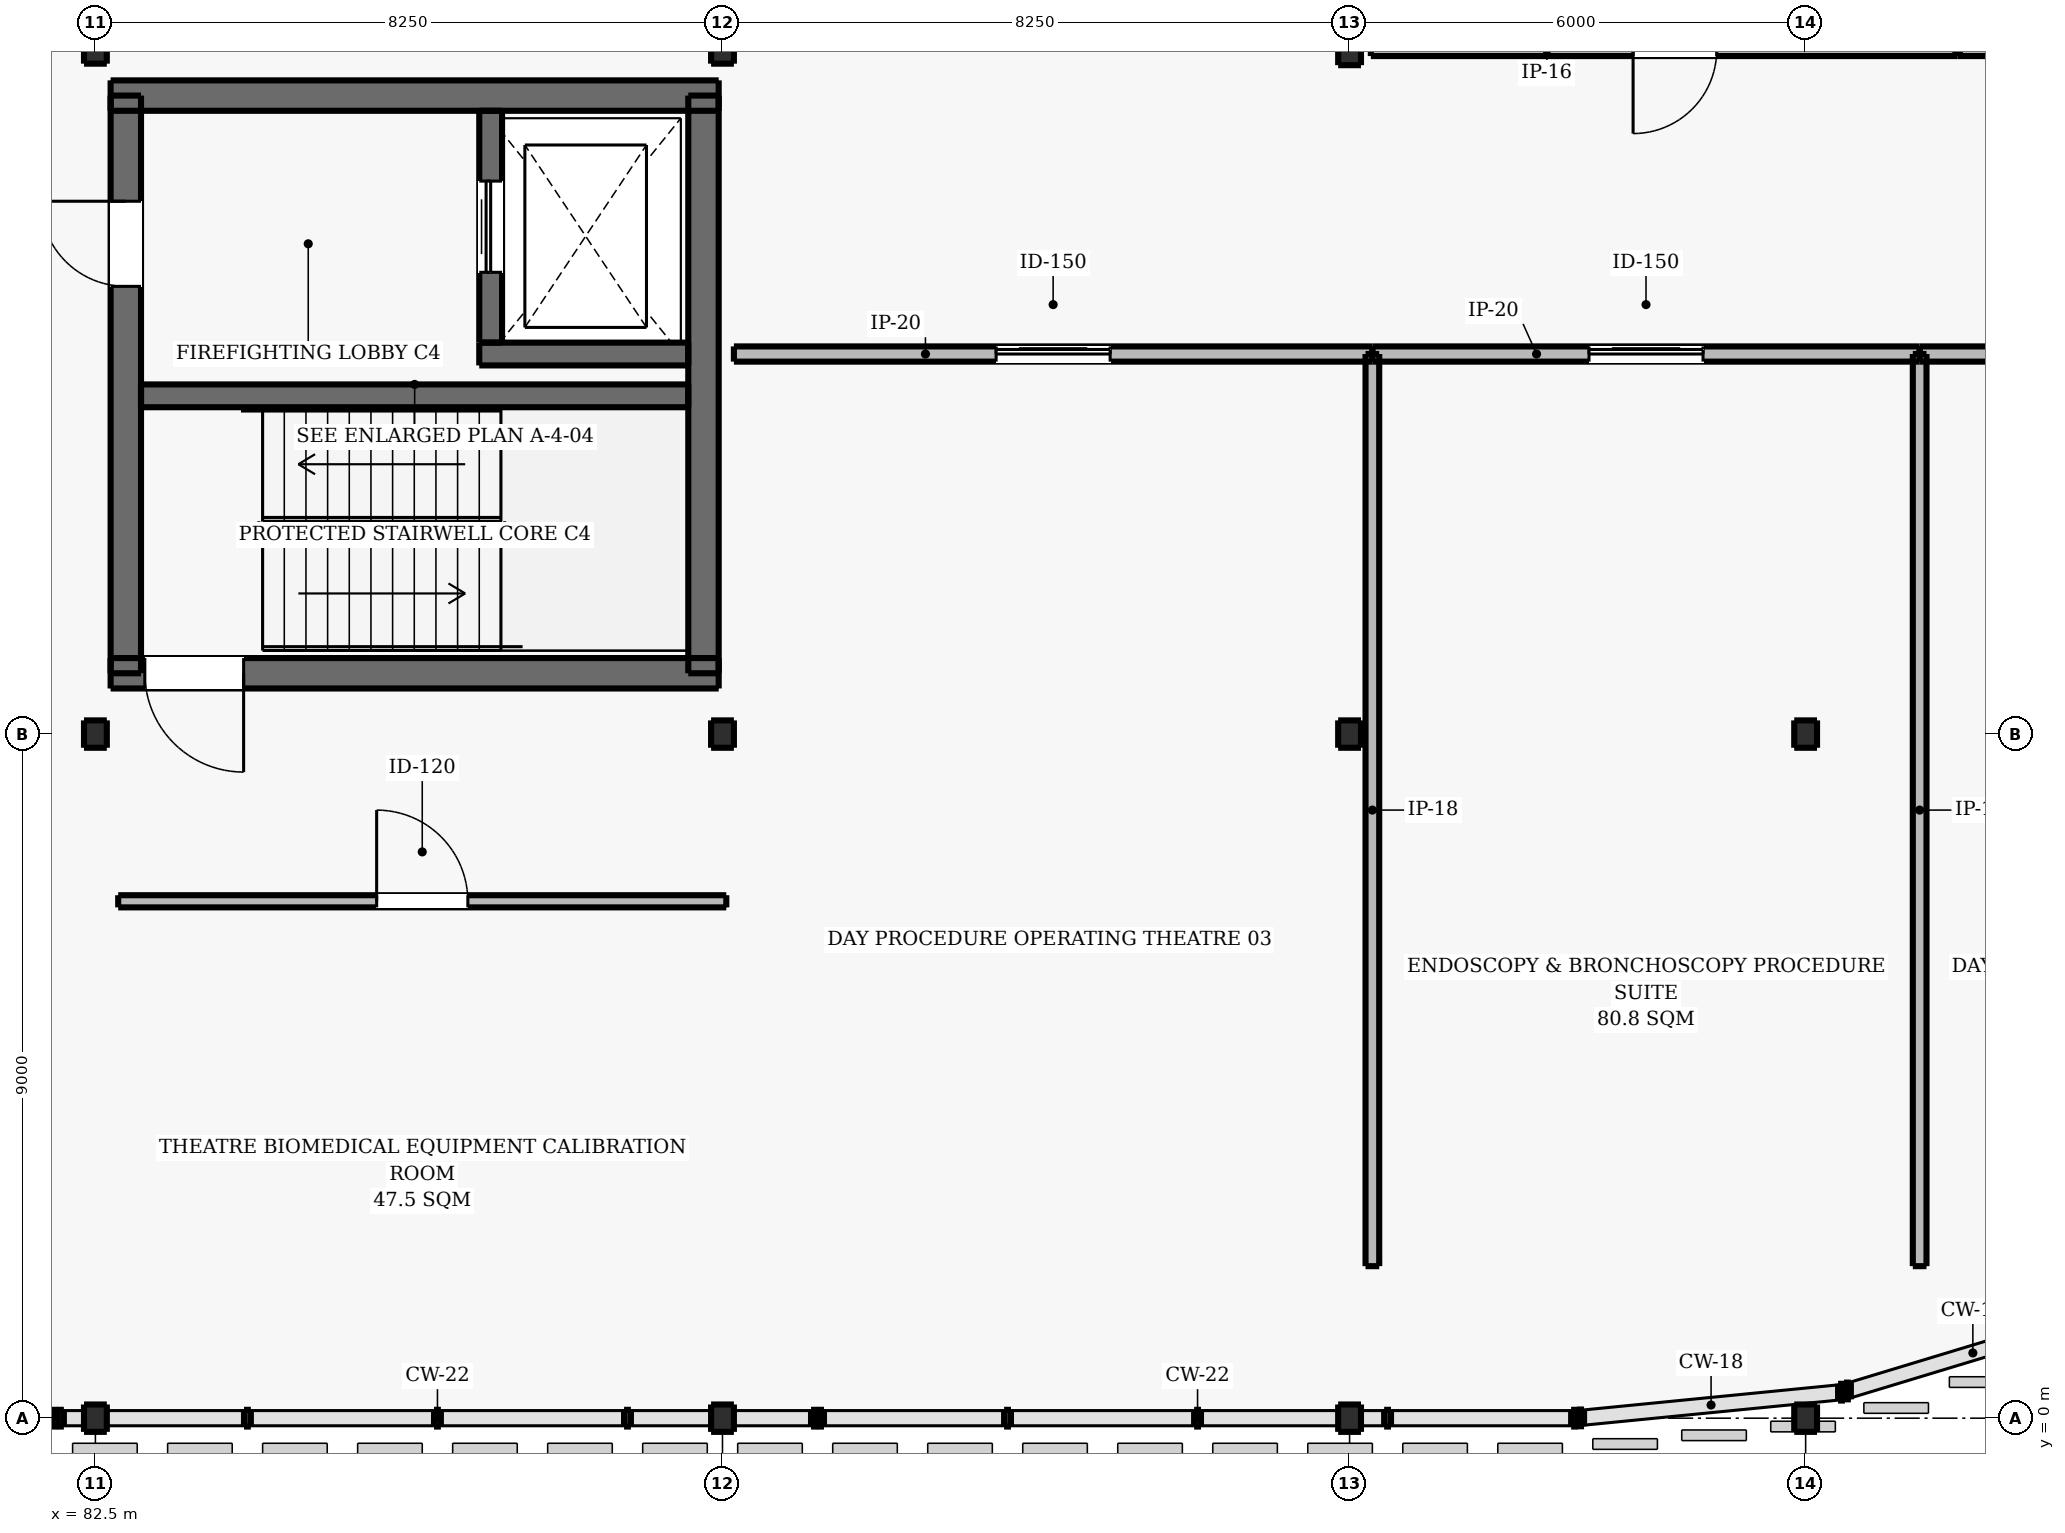
"""IFC4 building model, lengths in metres.
Left out: names, types, materials, properties, quantities, classifications, styles, units other than length and angle.
Written with IfcOpenShell. Run it as: python <this file> out.ifc"""

import sys

from ifc_helpers import new_model, si_unit, direction, frame, frame_2d, origin, origin_2d, place, context, subcontext, project, spatial, rectangle, i_section, extrude, element, fill, save


model = new_model("IFC4")
c1 = context("Model", 3, precision=1e-05, world=origin(), true_north=direction((0.0, 1.0)))
c2 = subcontext(c1, "Body", "Model", "MODEL_VIEW")
j1 = project(units=[si_unit("LENGTHUNIT", "METRE"), si_unit("PLANEANGLEUNIT", "RADIAN")], contexts=[c1])
p1 = place(None, origin())
s1 = spatial("IfcSite", under=j1, at=p1, CompositionType="ELEMENT")
p2 = place(p1, origin())
s2 = spatial("IfcBuilding", under=s1, at=p2, CompositionType="ELEMENT")
p3 = place(p2, frame((0.0, 0.0, 13.8)))
s3 = spatial("IfcBuildingStorey", under=s2, at=p3, CompositionType="ELEMENT", Elevation=13.8)
for number, where, z_axis, x_axis in (
    (1, (82.5, 0.0, 0.0), (0.0, 0.0, 1.0), (1.0, 0.0, 0.0)),
    (2, (82.5, 9.0, 0.0), (0.0, 0.0, 1.0), (1.0, 0.0, 0.0)),
    (3, (82.5, 18.0, 0.0), (0.0, 0.0, 1.0), (1.0, 0.0, 0.0)),
    (4, (90.75, 0.0, 0.0), (0.0, 0.0, 1.0), (1.0, 0.0, 0.0)),
    (5, (90.75, 9.0, 0.0), (0.0, 0.0, 1.0), (1.0, 0.0, 0.0)),
    (6, (90.75, 18.0, 0.0), (0.0, 0.0, 1.0), (1.0, 0.0, 0.0)),
    (7, (99.0, 0.0, 0.0), (0.0, 0.0, 1.0), (1.0, 0.0, 0.0)),
    (8, (99.0, 9.0, 0.0), (0.0, 0.0, 1.0), (1.0, 0.0, 0.0)),
):
    element("IfcColumn", number, at=place(p3, frame(where, z_axis=z_axis, x_axis=x_axis)), inside=s3, PredefinedType="COLUMN", context=c2, shape_type="SweptSolid", body=[
        extrude(i_section(OverallWidth=0.3, OverallDepth=0.36, WebThickness=0.012, FlangeThickness=0.022, FilletRadius=0.027, at=origin_2d()), origin(), (0.0, 0.0, 1.0), 4.2),
    ])
p4 = place(p3, frame((99.0, 18.0, 0.0), z_axis=(0.0, 0.0, 1.0), x_axis=(1.0, 0.0, 0.0)))
e9 = element("IfcColumn", 9, at=p4, inside=s3, PredefinedType="COLUMN", context=c2, shape_type="SweptSolid", body=[
    extrude(i_section(OverallWidth=0.3, OverallDepth=0.4, WebThickness=0.013, FlangeThickness=0.024, FilletRadius=0.027, at=origin_2d()), origin(), (0.0, 0.0, 1.0), 4.2),
])
for number, where, z_axis, x_axis in (
    (10, (105.0, 0.0, 0.0), (0.0, 0.0, 1.0), (1.0, 0.0, 0.0)),
    (11, (105.0, 9.0, 0.0), (0.0, 0.0, 1.0), (1.0, 0.0, 0.0)),
):
    element("IfcColumn", number, at=place(p3, frame(where, z_axis=z_axis, x_axis=x_axis)), inside=s3, PredefinedType="COLUMN", context=c2, shape_type="SweptSolid", body=[
        extrude(i_section(OverallWidth=0.3, OverallDepth=0.36, WebThickness=0.012, FlangeThickness=0.022, FilletRadius=0.027, at=origin_2d()), origin(), (0.0, 0.0, 1.0), 4.2),
    ])
p5 = place(p3, frame((82.7, 9.8, 0.0), z_axis=(0.0, 0.0, 1.0), x_axis=(1.0, 0.0, 0.0)))
e12 = element("IfcWall", 12, at=p5, inside=s3, PredefinedType="SHEAR", context=c2, shape_type="SweptSolid", body=[
    extrude(rectangle(XDim=8.0, YDim=0.4, at=frame_2d((4.0, 0.0))), origin(), (0.0, 0.0, 1.0), 4.2),
])
p6 = place(p5, frame((0.45, 0.0, 0.0)))
e13 = element("IfcOpeningElement", 13, at=p6, cuts=e12, PredefinedType="OPENING", context=c2, shape_type="SweptSolid", body=[
    extrude(rectangle(XDim=1.3, YDim=2.15, at=frame_2d((0.65, 1.075))), frame((0.0, 0.21, 0.0), z_axis=(0.0, -1.0, 0.0), x_axis=(1.0, 0.0, 0.0)), (0.0, 0.0, 1.0), 0.42),
])
p7 = place(p3, frame((82.7, 17.4, 0.0), z_axis=(0.0, 0.0, 1.0), x_axis=(1.0, 0.0, 0.0)))
e14 = element("IfcWall", 14, at=p7, inside=s3, PredefinedType="SHEAR", context=c2, shape_type="SweptSolid", body=[
    extrude(rectangle(XDim=8.0, YDim=0.4, at=frame_2d((4.0, 0.0))), origin(), (0.0, 0.0, 1.0), 4.2),
])
p8 = place(p3, frame((82.9, 9.8, 0.0), z_axis=(0.0, 0.0, 1.0), x_axis=(0.0, 1.0, 0.0)))
e15 = element("IfcWall", 15, at=p8, inside=s3, PredefinedType="SHEAR", context=c2, shape_type="SweptSolid", body=[
    extrude(rectangle(XDim=7.6, YDim=0.4, at=frame_2d((3.8, 0.0))), origin(), (0.0, 0.0, 1.0), 4.2),
])
p9 = place(p8, frame((5.09, 0.0, 0.0)))
e16 = element("IfcOpeningElement", 16, at=p9, cuts=e15, PredefinedType="OPENING", context=c2, shape_type="SweptSolid", body=[
    extrude(rectangle(XDim=1.12, YDim=2.15, at=frame_2d((0.56, 1.075))), frame((0.0, 0.21, 0.0), z_axis=(0.0, -1.0, 0.0), x_axis=(1.0, 0.0, 0.0)), (0.0, 0.0, 1.0), 0.42),
])
p10 = place(p3, frame((90.5, 9.8, 0.0), z_axis=(0.0, 0.0, 1.0), x_axis=(0.0, 1.0, 0.0)))
e17 = element("IfcWall", 17, at=p10, inside=s3, PredefinedType="SHEAR", context=c2, shape_type="SweptSolid", body=[
    extrude(rectangle(XDim=7.6, YDim=0.4, at=frame_2d((3.8, 0.0))), origin(), (0.0, 0.0, 1.0), 4.2),
])
p11 = place(p3, frame((83.1, 13.45, 0.0), z_axis=(0.0, 0.0, 1.0), x_axis=(1.0, 0.0, 0.0)))
e18 = element("IfcWall", 18, at=p11, inside=s3, PredefinedType="SHEAR", context=c2, shape_type="SweptSolid", body=[
    extrude(rectangle(XDim=7.2, YDim=0.3, at=frame_2d((3.6, 0.0))), origin(), (0.0, 0.0, 1.0), 4.2),
])
p12 = place(p3, frame((87.55, 14.0, 0.0), z_axis=(0.0, 0.0, 1.0), x_axis=(1.0, 0.0, 0.0)))
e19 = element("IfcWall", 19, at=p12, inside=s3, PredefinedType="SHEAR", context=c2, shape_type="SweptSolid", body=[
    extrude(rectangle(XDim=2.75, YDim=0.3, at=frame_2d((1.375, 0.0))), origin(), (0.0, 0.0, 1.0), 4.2),
])
p13 = place(p3, frame((87.7, 14.15, 0.0), z_axis=(0.0, 0.0, 1.0), x_axis=(0.0, 1.0, 0.0)))
e20 = element("IfcWall", 20, at=p13, inside=s3, PredefinedType="SHEAR", context=c2, shape_type="SweptSolid", body=[
    extrude(rectangle(XDim=3.05, YDim=0.3, at=frame_2d((1.525, 0.0))), origin(), (0.0, 0.0, 1.0), 4.2),
])
p14 = place(p13, frame((0.925, 0.0, 0.0)))
e21 = element("IfcOpeningElement", 21, at=p14, cuts=e20, PredefinedType="OPENING", context=c2, shape_type="SweptSolid", body=[
    extrude(rectangle(XDim=1.2, YDim=2.15, at=frame_2d((0.6, 1.075))), frame((0.0, 0.16, 0.0), z_axis=(0.0, -1.0, 0.0), x_axis=(1.0, 0.0, 0.0)), (0.0, 0.0, 1.0), 0.32),
])
p15 = place(p3, frame((90.9, 14.0, 0.0), z_axis=(0.0, 0.0, 1.0), x_axis=(1.0, 0.0, 0.0)))
e22 = element("IfcWall", 22, at=p15, inside=s3, PredefinedType="PARTITIONING", context=c2, shape_type="SweptSolid", body=[
    extrude(rectangle(XDim=8.4, YDim=0.2, at=frame_2d((4.2, 0.0))), origin(), (0.0, 0.0, 1.0), 3.94),
])
p16 = place(p15, frame((3.45, 0.0, 0.0)))
e23 = element("IfcOpeningElement", 23, at=p16, cuts=e22, PredefinedType="OPENING", context=c2, shape_type="SweptSolid", body=[
    extrude(rectangle(XDim=1.5, YDim=2.25, at=frame_2d((0.75, 1.125))), frame((0.0, 0.11, 0.0), z_axis=(0.0, -1.0, 0.0), x_axis=(1.0, 0.0, 0.0)), (0.0, 0.0, 1.0), 0.22),
])
p17 = place(p3, frame((99.3, 2.0, 0.0), z_axis=(0.0, 0.0, 1.0), x_axis=(0.0, 1.0, 0.0)))
e24 = element("IfcWall", 24, at=p17, inside=s3, PredefinedType="PARTITIONING", context=c2, shape_type="SweptSolid", body=[
    extrude(rectangle(XDim=12.0, YDim=0.18, at=frame_2d((6.0, 0.0))), origin(), (0.0, 0.0, 1.0), 3.94),
])
p18 = place(p3, frame((99.3, 14.0, 0.0), z_axis=(0.0, 0.0, 1.0), x_axis=(1.0, 0.0, 0.0)))
e25 = element("IfcWall", 25, at=p18, inside=s3, PredefinedType="PARTITIONING", context=c2, shape_type="SweptSolid", body=[
    extrude(rectangle(XDim=7.2, YDim=0.2, at=frame_2d((3.6, 0.0))), origin(), (0.0, 0.0, 1.0), 3.94),
])
p19 = place(p18, frame((2.85, 0.0, 0.0)))
e26 = element("IfcOpeningElement", 26, at=p19, cuts=e25, PredefinedType="OPENING", context=c2, shape_type="SweptSolid", body=[
    extrude(rectangle(XDim=1.5, YDim=2.25, at=frame_2d((0.75, 1.125))), frame((0.0, 0.11, 0.0), z_axis=(0.0, -1.0, 0.0), x_axis=(1.0, 0.0, 0.0)), (0.0, 0.0, 1.0), 0.22),
])
p20 = place(p3, frame((106.5, 2.0, 0.0), z_axis=(0.0, 0.0, 1.0), x_axis=(0.0, 1.0, 0.0)))
e27 = element("IfcWall", 27, at=p20, inside=s3, PredefinedType="PARTITIONING", context=c2, shape_type="SweptSolid", body=[
    extrude(rectangle(XDim=12.0, YDim=0.18, at=frame_2d((6.0, 0.0))), origin(), (0.0, 0.0, 1.0), 3.94),
])
p21 = place(p3, frame((106.5, 14.0, 0.0), z_axis=(0.0, 0.0, 1.0), x_axis=(1.0, 0.0, 0.0)))
e28 = element("IfcWall", 28, at=p21, inside=s3, PredefinedType="PARTITIONING", context=c2, shape_type="SweptSolid", body=[
    extrude(rectangle(XDim=7.5, YDim=0.2, at=frame_2d((3.75, 0.0))), origin(), (0.0, 0.0, 1.0), 3.94),
])
p22 = place(p21, frame((3.0, 0.0, 0.0)))
e29 = element("IfcOpeningElement", 29, at=p22, cuts=e28, PredefinedType="OPENING", context=c2, shape_type="SweptSolid", body=[
    extrude(rectangle(XDim=1.5, YDim=2.25, at=frame_2d((0.75, 1.125))), frame((0.0, 0.11, 0.0), z_axis=(0.0, -1.0, 0.0), x_axis=(1.0, 0.0, 0.0)), (0.0, 0.0, 1.0), 0.22),
])
p23 = place(p3, frame((99.28, 18.0, 0.0), z_axis=(0.0, 0.0, 1.0), x_axis=(1.0, 0.0, 0.0)))
e30 = element("IfcWall", 30, at=p23, inside=s3, PredefinedType="PARTITIONING", context=c2, shape_type="SweptSolid", body=[
    extrude(rectangle(XDim=7.72, YDim=0.16, at=frame_2d((3.86, 0.0))), origin(), (0.0, 0.0, 1.0), 3.49),
])
p24 = place(p23, frame((3.45, 0.0, 0.0)))
e31 = element("IfcOpeningElement", 31, at=p24, cuts=e30, PredefinedType="OPENING", context=c2, shape_type="SweptSolid", body=[
    extrude(rectangle(XDim=1.1, YDim=2.15, at=frame_2d((0.55, 1.075))), frame((0.0, 0.09, 0.0), z_axis=(0.0, -1.0, 0.0), x_axis=(1.0, 0.0, 0.0)), (0.0, 0.0, 1.0), 0.18),
])
p25 = place(p3, frame((107.0, 18.0, 0.0), z_axis=(0.0, 0.0, 1.0), x_axis=(1.0, 0.0, 0.0)))
e32 = element("IfcWall", 32, at=p25, inside=s3, PredefinedType="PARTITIONING", context=c2, shape_type="SweptSolid", body=[
    extrude(rectangle(XDim=3.72, YDim=0.16, at=frame_2d((1.86, 0.0))), origin(), (0.0, 0.0, 1.0), 3.49),
])
p26 = place(p25, frame((1.525, 0.0, 0.0)))
e33 = element("IfcOpeningElement", 33, at=p26, cuts=e32, PredefinedType="OPENING", context=c2, shape_type="SweptSolid", body=[
    extrude(rectangle(XDim=0.95, YDim=2.1, at=frame_2d((0.475, 1.05))), frame((0.0, 0.09, 0.0), z_axis=(0.0, -1.0, 0.0), x_axis=(1.0, 0.0, 0.0)), (0.0, 0.0, 1.0), 0.18),
])
p27 = place(p3, frame((82.8, 6.8, 0.0), z_axis=(0.0, 0.0, 1.0), x_axis=(1.0, 0.0, 0.0)))
e34 = element("IfcWall", 34, at=p27, inside=s3, PredefinedType="PARTITIONING", context=c2, shape_type="SweptSolid", body=[
    extrude(rectangle(XDim=8.0, YDim=0.16, at=frame_2d((4.0, 0.0))), origin(), (0.0, 0.0, 1.0), 3.94),
])
p28 = place(p27, frame((3.4, 0.0, 0.0)))
e35 = element("IfcOpeningElement", 35, at=p28, cuts=e34, PredefinedType="OPENING", context=c2, shape_type="SweptSolid", body=[
    extrude(rectangle(XDim=1.2, YDim=2.2, at=frame_2d((0.6, 1.1))), frame((0.0, 0.09, 0.0), z_axis=(0.0, -1.0, 0.0), x_axis=(1.0, 0.0, 0.0)), (0.0, 0.0, 1.0), 0.18),
])
p29 = place(p14, origin())
e36 = element("IfcDoor", 36, at=p29, inside=s3, OperationType="DOUBLE_DOOR_SLIDING", PredefinedType="DOOR", context=c2, shape_type="SweptSolid", body=[
    extrude(rectangle(XDim=1.2, YDim=2.15, at=frame_2d((0.6, 1.075))), frame((0.0, 0.025, 0.0), z_axis=(0.0, -1.0, 0.0), x_axis=(1.0, 0.0, 0.0)), (0.0, 0.0, 1.0), 0.05),
])
fill(e21, e36)
p30 = place(p9, origin())
e37 = element("IfcDoor", 37, at=p30, inside=s3, OperationType="SINGLE_SWING_RIGHT", PredefinedType="DOOR", context=c2, shape_type="SweptSolid", body=[
    extrude(rectangle(XDim=1.12, YDim=2.15, at=frame_2d((0.56, 1.075))), frame((0.0, 0.025, 0.0), z_axis=(0.0, -1.0, 0.0), x_axis=(1.0, 0.0, 0.0)), (0.0, 0.0, 1.0), 0.05),
])
fill(e16, e37)
p31 = place(p6, frame((1.3, 0.0, 0.0), z_axis=(0.0, 0.0, 1.0), x_axis=(-1.0, 0.0, 0.0)))
e38 = element("IfcDoor", 38, at=p31, inside=s3, OperationType="SINGLE_SWING_RIGHT", PredefinedType="DOOR", context=c2, shape_type="SweptSolid", body=[
    extrude(rectangle(XDim=1.3, YDim=2.15, at=frame_2d((0.65, 1.075))), frame((0.0, 0.025, 0.0), z_axis=(0.0, -1.0, 0.0), x_axis=(1.0, 0.0, 0.0)), (0.0, 0.0, 1.0), 0.05),
])
fill(e13, e38)
p32 = place(p16, origin())
e39 = element("IfcDoor", 39, at=p32, inside=s3, OperationType="SLIDING_TO_LEFT", PredefinedType="DOOR", context=c2, shape_type="SweptSolid", body=[
    extrude(rectangle(XDim=1.5, YDim=2.25, at=frame_2d((0.75, 1.125))), frame((0.0, 0.025, 0.0), z_axis=(0.0, -1.0, 0.0), x_axis=(1.0, 0.0, 0.0)), (0.0, 0.0, 1.0), 0.05),
])
fill(e23, e39)
p33 = place(p19, origin())
e40 = element("IfcDoor", 40, at=p33, inside=s3, OperationType="SLIDING_TO_LEFT", PredefinedType="DOOR", context=c2, shape_type="SweptSolid", body=[
    extrude(rectangle(XDim=1.5, YDim=2.25, at=frame_2d((0.75, 1.125))), frame((0.0, 0.025, 0.0), z_axis=(0.0, -1.0, 0.0), x_axis=(1.0, 0.0, 0.0)), (0.0, 0.0, 1.0), 0.05),
])
fill(e26, e40)
p34 = place(p28, origin())
e41 = element("IfcDoor", 41, at=p34, inside=s3, OperationType="SINGLE_SWING_LEFT", PredefinedType="DOOR", context=c2, shape_type="SweptSolid", body=[
    extrude(rectangle(XDim=1.2, YDim=2.2, at=frame_2d((0.6, 1.1))), frame((0.0, 0.025, 0.0), z_axis=(0.0, -1.0, 0.0), x_axis=(1.0, 0.0, 0.0)), (0.0, 0.0, 1.0), 0.05),
])
fill(e35, e41)
save(model, sys.argv[1])
